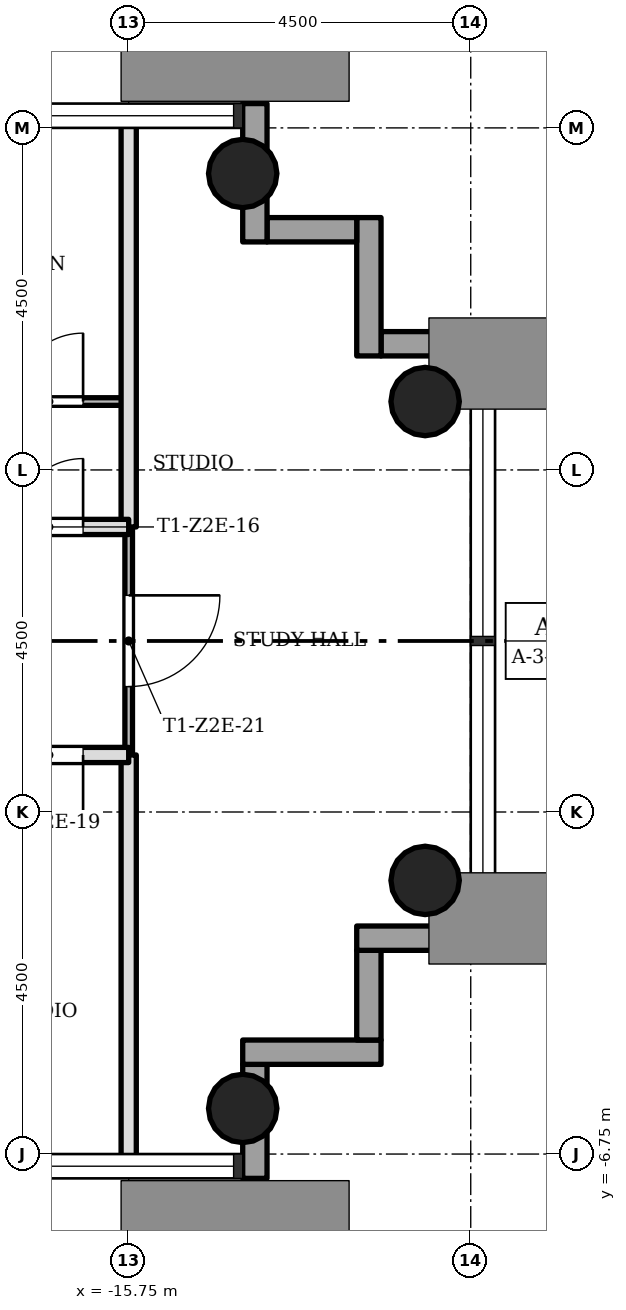
"""IFC4 building model, lengths in metres.
Left out: names, types, materials, properties, quantities, classifications, styles, units other than length and angle.
Written with IfcOpenShell. Run it as: python <this file> out.ifc"""

import sys

from ifc_helpers import new_model, si_unit, direction, frame, frame_2d, origin, origin_2d, place, context, subcontext, project, spatial, rectangle, hollow_circle, extrude, element, fill, save


model = new_model("IFC4")
c1 = context("Model", 3, precision=1e-05, world=origin(), true_north=direction((0.0, 1.0)))
c2 = subcontext(c1, "Body", "Model", "MODEL_VIEW")
j1 = project(units=[si_unit("LENGTHUNIT", "METRE"), si_unit("PLANEANGLEUNIT", "RADIAN")], contexts=[c1])
p1 = place(None, origin())
s1 = spatial("IfcSite", under=j1, at=p1, CompositionType="ELEMENT")
p2 = place(p1, origin())
s2 = spatial("IfcBuilding", under=s1, at=p2, CompositionType="ELEMENT")
p3 = place(p2, frame((0.0, 0.0, 100.4)))
s3 = spatial("IfcBuildingStorey", under=s2, at=p3, CompositionType="ELEMENT", Elevation=100.4)
for number, where, z_axis, x_axis in (
    (1, (-14.25, -6.15, 0.0), (0.0, 0.0, 1.0), (1.0, 0.0, 0.0)),
    (2, (-14.25, 6.15, 0.0), (0.0, 0.0, 1.0), (1.0, 0.0, 0.0)),
    (3, (-11.85, -3.15, 0.0), (0.0, 0.0, 1.0), (1.0, 0.0, 0.0)),
    (4, (-11.85, 3.15, 0.0), (0.0, 0.0, 1.0), (1.0, 0.0, 0.0)),
):
    element("IfcColumn", number, at=place(p3, frame(where, z_axis=z_axis, x_axis=x_axis)), inside=s3, PredefinedType="COLUMN", context=c2, shape_type="SweptSolid", body=[
        extrude(hollow_circle(Radius=0.45, WallThickness=0.032, at=origin_2d()), origin(), (0.0, 0.0, 1.0), 3.4),
    ])
p4 = place(p3, frame((-14.09, -7.07, -0.3), z_axis=(0.0, 0.0, 1.0), x_axis=(0.0, 1.0, 0.0)))
e5 = element("IfcWall", 5, at=p4, inside=s3, PredefinedType="STANDARD", context=c2, shape_type="SweptSolid", body=[
    extrude(rectangle(XDim=1.5, YDim=0.32, at=frame_2d((0.75, 0.0))), origin(), (0.0, 0.0, 1.0), 3.4),
])
p5 = place(p3, frame((-14.25, -5.41, -0.3), z_axis=(0.0, 0.0, 1.0), x_axis=(1.0, 0.0, 0.0)))
e6 = element("IfcWall", 6, at=p5, inside=s3, PredefinedType="STANDARD", context=c2, shape_type="SweptSolid", body=[
    extrude(rectangle(XDim=1.82, YDim=0.32, at=frame_2d((0.91, 0.0))), origin(), (0.0, 0.0, 1.0), 3.4),
])
p6 = place(p3, frame((-12.59, -5.25, -0.3), z_axis=(0.0, 0.0, 1.0), x_axis=(0.0, 1.0, 0.0)))
e7 = element("IfcWall", 7, at=p6, inside=s3, PredefinedType="STANDARD", context=c2, shape_type="SweptSolid", body=[
    extrude(rectangle(XDim=1.18, YDim=0.32, at=frame_2d((0.59, 0.0))), origin(), (0.0, 0.0, 1.0), 3.4),
])
p7 = place(p3, frame((-12.75, -3.91, -0.3), z_axis=(0.0, 0.0, 1.0), x_axis=(1.0, 0.0, 0.0)))
e8 = element("IfcWall", 8, at=p7, inside=s3, PredefinedType="STANDARD", context=c2, shape_type="SweptSolid", body=[
    extrude(rectangle(XDim=1.82, YDim=0.32, at=frame_2d((0.91, 0.0))), origin(), (0.0, 0.0, 1.0), 3.4),
])
p8 = place(p3, frame((-10.93, 3.91, -0.3), z_axis=(0.0, 0.0, 1.0), x_axis=(-1.0, 0.0, 0.0)))
e9 = element("IfcWall", 9, at=p8, inside=s3, PredefinedType="STANDARD", context=c2, shape_type="SweptSolid", body=[
    extrude(rectangle(XDim=1.5, YDim=0.32, at=frame_2d((0.75, 0.0))), origin(), (0.0, 0.0, 1.0), 3.4),
])
p9 = place(p3, frame((-12.59, 3.75, -0.3), z_axis=(0.0, 0.0, 1.0), x_axis=(0.0, 1.0, 0.0)))
e10 = element("IfcWall", 10, at=p9, inside=s3, PredefinedType="STANDARD", context=c2, shape_type="SweptSolid", body=[
    extrude(rectangle(XDim=1.82, YDim=0.32, at=frame_2d((0.91, 0.0))), origin(), (0.0, 0.0, 1.0), 3.4),
])
p10 = place(p3, frame((-12.75, 5.41, -0.3), z_axis=(0.0, 0.0, 1.0), x_axis=(-1.0, 0.0, 0.0)))
e11 = element("IfcWall", 11, at=p10, inside=s3, PredefinedType="STANDARD", context=c2, shape_type="SweptSolid", body=[
    extrude(rectangle(XDim=1.18, YDim=0.32, at=frame_2d((0.59, 0.0))), origin(), (0.0, 0.0, 1.0), 3.4),
])
p11 = place(p3, frame((-14.09, 5.25, -0.3), z_axis=(0.0, 0.0, 1.0), x_axis=(0.0, 1.0, 0.0)))
e12 = element("IfcWall", 12, at=p11, inside=s3, PredefinedType="STANDARD", context=c2, shape_type="SweptSolid", body=[
    extrude(rectangle(XDim=1.82, YDim=0.32, at=frame_2d((0.91, 0.0))), origin(), (0.0, 0.0, 1.0), 3.4),
])
p12 = place(p3, frame((-15.75, -1.5, 0.0), z_axis=(0.0, 0.0, 1.0), x_axis=(0.0, 1.0, 0.0)))
e13 = element("IfcWall", 13, at=p12, inside=s3, PredefinedType="PARTITIONING", context=c2, shape_type="SweptSolid", body=[
    extrude(rectangle(XDim=3.0, YDim=0.1, at=frame_2d((1.5, 0.0))), origin(), (0.0, 0.0, 1.0), 3.0),
])
p13 = place(p12, frame((0.9, 0.0, 0.0)))
e14 = element("IfcOpeningElement", 14, at=p13, cuts=e13, PredefinedType="OPENING", context=c2, shape_type="SweptSolid", body=[
    extrude(rectangle(XDim=1.2, YDim=2.1, at=frame_2d((0.6, 1.05))), frame((0.0, 0.06, 0.0), z_axis=(0.0, -1.0, 0.0), x_axis=(1.0, 0.0, 0.0)), (0.0, 0.0, 1.0), 0.12),
])
for number, where, z_axis, x_axis in (
    (15, (-15.75, -6.85, 0.0), (0.0, 0.0, 1.0), (0.0, 1.0, 0.0)),
    (16, (-15.75, 1.5, 0.0), (0.0, 0.0, 1.0), (0.0, 1.0, 0.0)),
):
    element("IfcWall", number, at=place(p3, frame(where, z_axis=z_axis, x_axis=x_axis)), inside=s3, PredefinedType="SOLIDWALL", context=c2, shape_type="SweptSolid", body=[
        extrude(rectangle(XDim=5.35, YDim=0.2, at=frame_2d((2.675, 0.0))), origin(), (0.0, 0.0, 1.0), 3.0),
    ])
p14 = place(p3, frame((-20.25, -1.5, 0.0), z_axis=(0.0, 0.0, 1.0), x_axis=(1.0, 0.0, 0.0)))
e17 = element("IfcWall", 17, at=p14, inside=s3, PredefinedType="SOLIDWALL", context=c2, shape_type="SweptSolid", body=[
    extrude(rectangle(XDim=4.5, YDim=0.2, at=frame_2d((2.25, 0.0))), origin(), (0.0, 0.0, 1.0), 3.0),
])
p15 = place(p14, frame((3.0, 0.0, 0.0)))
e18 = element("IfcOpeningElement", 18, at=p15, cuts=e17, PredefinedType="OPENING", context=c2, shape_type="SweptSolid", body=[
    extrude(rectangle(XDim=0.9, YDim=2.1, at=frame_2d((0.45, 1.05))), frame((0.0, 0.11, 0.0), z_axis=(0.0, -1.0, 0.0), x_axis=(1.0, 0.0, 0.0)), (0.0, 0.0, 1.0), 0.22),
])
p16 = place(p3, frame((-20.25, 1.5, 0.0), z_axis=(0.0, 0.0, 1.0), x_axis=(1.0, 0.0, 0.0)))
e19 = element("IfcWall", 19, at=p16, inside=s3, PredefinedType="SOLIDWALL", context=c2, shape_type="SweptSolid", body=[
    extrude(rectangle(XDim=4.5, YDim=0.2, at=frame_2d((2.25, 0.0))), origin(), (0.0, 0.0, 1.0), 3.0),
])
p17 = place(p16, frame((3.0, 0.0, 0.0)))
e20 = element("IfcOpeningElement", 20, at=p17, cuts=e19, PredefinedType="OPENING", context=c2, shape_type="SweptSolid", body=[
    extrude(rectangle(XDim=0.9, YDim=2.1, at=frame_2d((0.45, 1.05))), frame((0.0, 0.11, 0.0), z_axis=(0.0, -1.0, 0.0), x_axis=(1.0, 0.0, 0.0)), (0.0, 0.0, 1.0), 0.22),
])
p18 = place(p3, frame((-20.25, 3.15, 0.0), z_axis=(0.0, 0.0, 1.0), x_axis=(1.0, 0.0, 0.0)))
e21 = element("IfcWall", 21, at=p18, inside=s3, PredefinedType="PARTITIONING", context=c2, shape_type="SweptSolid", body=[
    extrude(rectangle(XDim=4.5, YDim=0.1, at=frame_2d((2.25, 0.0))), origin(), (0.0, 0.0, 1.0), 3.0),
])
p19 = place(p18, frame((3.0, 0.0, 0.0)))
e22 = element("IfcOpeningElement", 22, at=p19, cuts=e21, PredefinedType="OPENING", context=c2, shape_type="SweptSolid", body=[
    extrude(rectangle(XDim=0.9, YDim=2.1, at=frame_2d((0.45, 1.05))), frame((0.0, 0.06, 0.0), z_axis=(0.0, -1.0, 0.0), x_axis=(1.0, 0.0, 0.0)), (0.0, 0.0, 1.0), 0.12),
])
p20 = place(p17, origin())
e23 = element("IfcDoor", 23, at=p20, inside=s3, OperationType="SINGLE_SWING_LEFT", PredefinedType="DOOR", context=c2, shape_type="SweptSolid", body=[
    extrude(rectangle(XDim=0.9, YDim=2.1, at=frame_2d((0.45, 1.05))), frame((0.0, 0.025, 0.0), z_axis=(0.0, -1.0, 0.0), x_axis=(1.0, 0.0, 0.0)), (0.0, 0.0, 1.0), 0.05),
])
fill(e20, e23)
p21 = place(p19, origin())
e24 = element("IfcDoor", 24, at=p21, inside=s3, OperationType="SINGLE_SWING_LEFT", PredefinedType="DOOR", context=c2, shape_type="SweptSolid", body=[
    extrude(rectangle(XDim=0.9, YDim=2.1, at=frame_2d((0.45, 1.05))), frame((0.0, 0.025, 0.0), z_axis=(0.0, -1.0, 0.0), x_axis=(1.0, 0.0, 0.0)), (0.0, 0.0, 1.0), 0.05),
])
fill(e22, e24)
p22 = place(p15, origin())
e25 = element("IfcDoor", 25, at=p22, inside=s3, OperationType="SINGLE_SWING_RIGHT", PredefinedType="DOOR", context=c2, shape_type="SweptSolid", body=[
    extrude(rectangle(XDim=0.9, YDim=2.1, at=frame_2d((0.45, 1.05))), frame((0.0, 0.025, 0.0), z_axis=(0.0, -1.0, 0.0), x_axis=(1.0, 0.0, 0.0)), (0.0, 0.0, 1.0), 0.05),
])
fill(e18, e25)
p23 = place(p13, origin())
e26 = element("IfcDoor", 26, at=p23, inside=s3, OperationType="SINGLE_SWING_RIGHT", PredefinedType="DOOR", context=c2, shape_type="SweptSolid", body=[
    extrude(rectangle(XDim=1.2, YDim=2.1, at=frame_2d((0.6, 1.05))), frame((0.0, 0.025, 0.0), z_axis=(0.0, -1.0, 0.0), x_axis=(1.0, 0.0, 0.0)), (0.0, 0.0, 1.0), 0.05),
])
fill(e14, e26)
save(model, sys.argv[1])
